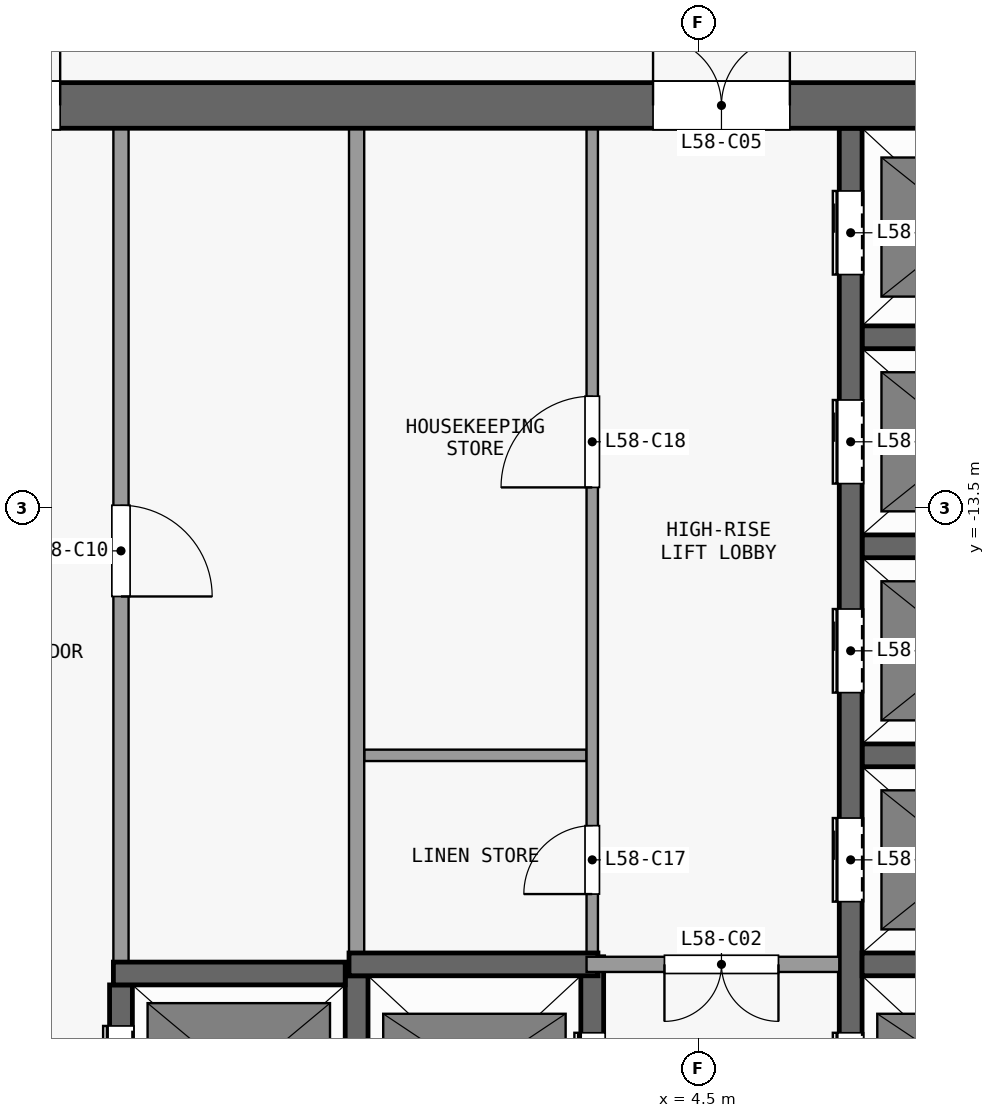
"""IFC4 building model, lengths in metres.
Left out: names, types, materials, properties, quantities, classifications, styles, units other than length and angle.
Written with IfcOpenShell. Run it as: python <this file> out.ifc"""

import sys

from ifc_helpers import new_model, si_unit, direction, frame, frame_2d, origin, place, context, subcontext, project, spatial, rectangle, extrude, element, fill, save


model = new_model("IFC4")
c1 = context("Model", 3, precision=1e-05, world=origin(), true_north=direction((0.0, 1.0)))
c2 = subcontext(c1, "Body", "Model", "MODEL_VIEW")
j1 = project(units=[si_unit("LENGTHUNIT", "METRE"), si_unit("PLANEANGLEUNIT", "RADIAN")], contexts=[c1])
p1 = place(None, origin())
s1 = spatial("IfcSite", under=j1, at=p1, CompositionType="ELEMENT")
p2 = place(p1, origin())
s2 = spatial("IfcBuilding", under=s1, at=p2, CompositionType="ELEMENT")
p3 = place(p2, frame((0.0, 0.0, 230.3)))
s3 = spatial("IfcBuildingStorey", under=s2, at=p3, CompositionType="ELEMENT", Elevation=230.3)
p4 = place(p3, frame((-13.2, -8.2, 0.0), z_axis=(0.0, 0.0, 1.0), x_axis=(1.0, 0.0, 0.0)))
e1 = element("IfcWall", 1, at=p4, inside=s3, PredefinedType="SHEAR", context=c2, shape_type="SweptSolid", body=[
    extrude(rectangle(XDim=26.4, YDim=0.6, at=frame_2d((13.2, 0.0))), origin(), (0.0, 0.0, 1.0), 3.3),
])
p5 = place(p4, frame((7.5, 0.0, 0.0)))
e2 = element("IfcOpeningElement", 2, at=p5, cuts=e1, PredefinedType="OPENING", context=c2, shape_type="SweptSolid", body=[
    extrude(rectangle(XDim=1.8, YDim=2.1, at=frame_2d((0.9, 1.05))), frame((0.0, 0.31, 0.0), z_axis=(0.0, -1.0, 0.0), x_axis=(1.0, 0.0, 0.0)), (0.0, 0.0, 1.0), 0.62),
])
p6 = place(p4, frame((17.1, 0.0, 0.0)))
e3 = element("IfcOpeningElement", 3, at=p6, cuts=e1, PredefinedType="OPENING", context=c2, shape_type="SweptSolid", body=[
    extrude(rectangle(XDim=1.8, YDim=2.1, at=frame_2d((0.9, 1.05))), frame((0.0, 0.31, 0.0), z_axis=(0.0, -1.0, 0.0), x_axis=(1.0, 0.0, 0.0)), (0.0, 0.0, 1.0), 0.62),
])
p7 = place(p4, frame((2.425, 0.0, 0.0)))
e4 = element("IfcOpeningElement", 4, at=p7, cuts=e1, PredefinedType="OPENING", context=c2, shape_type="SweptSolid", body=[
    extrude(rectangle(XDim=0.9, YDim=2.1, at=frame_2d((0.45, 1.05))), frame((0.0, 0.31, 0.0), z_axis=(0.0, -1.0, 0.0), x_axis=(1.0, 0.0, 0.0)), (0.0, 0.0, 1.0), 0.62),
])
p8 = place(p4, frame((23.075, 0.0, 0.0)))
e5 = element("IfcOpeningElement", 5, at=p8, cuts=e1, PredefinedType="OPENING", context=c2, shape_type="SweptSolid", body=[
    extrude(rectangle(XDim=0.9, YDim=2.1, at=frame_2d((0.45, 1.05))), frame((0.0, 0.31, 0.0), z_axis=(0.0, -1.0, 0.0), x_axis=(1.0, 0.0, 0.0)), (0.0, 0.0, 1.0), 0.62),
])
p9 = place(p3, frame((-3.2, -19.62, 0.0), z_axis=(0.0, 0.0, 1.0), x_axis=(1.0, 0.0, 0.0)))
e6 = element("IfcWall", 6, at=p9, inside=s3, PredefinedType="SHEAR", context=c2, shape_type="SweptSolid", body=[
    extrude(rectangle(XDim=3.05, YDim=0.3, at=frame_2d((1.525, 0.0))), origin(), (0.0, 0.0, 1.0), 3.3),
])
p10 = place(p3, frame((-0.1, -19.5, 0.0), z_axis=(0.0, 0.0, 1.0), x_axis=(1.0, 0.0, 0.0)))
e7 = element("IfcWall", 7, at=p10, inside=s3, PredefinedType="SHEAR", context=c2, shape_type="SweptSolid", body=[
    extrude(rectangle(XDim=3.275, YDim=0.3, at=frame_2d((1.638, 0.0))), origin(), (0.0, 0.0, 1.0), 3.3),
])
p11 = place(p3, frame((6.35, -19.5, 0.0), z_axis=(0.0, 0.0, 1.0), x_axis=(-1.0, 0.0, 0.0)))
e8 = element("IfcWall", 8, at=p11, inside=s3, PredefinedType="PARTITIONING", context=c2, shape_type="SweptSolid", body=[
    extrude(rectangle(XDim=3.325, YDim=0.2, at=frame_2d((1.663, 0.0))), origin(), (0.0, 0.0, 1.0), 3.3),
])
p12 = place(p11, frame((0.8, 0.0, 0.0)))
e9 = element("IfcOpeningElement", 9, at=p12, cuts=e8, PredefinedType="OPENING", context=c2, shape_type="SweptSolid", body=[
    extrude(rectangle(XDim=1.5, YDim=2.1, at=frame_2d((0.75, 1.05))), frame((0.0, 0.11, 0.0), z_axis=(0.0, -1.0, 0.0), x_axis=(1.0, 0.0, 0.0)), (0.0, 0.0, 1.0), 0.22),
])
p13 = place(p3, frame((6.65, -19.5, 0.0), z_axis=(0.0, 0.0, 1.0), x_axis=(1.0, 0.0, 0.0)))
e10 = element("IfcWall", 10, at=p13, inside=s3, PredefinedType="SHEAR", context=c2, shape_type="SweptSolid", body=[
    extrude(rectangle(XDim=2.8, YDim=0.3, at=frame_2d((1.4, 0.0))), origin(), (0.0, 0.0, 1.0), 3.3),
])
p14 = place(p3, frame((0.1, -16.75, 0.0), z_axis=(0.0, 0.0, 1.0), x_axis=(1.0, 0.0, 0.0)))
e11 = element("IfcWall", 11, at=p14, inside=s3, PredefinedType="PARTITIONING", context=c2, shape_type="SweptSolid", body=[
    extrude(rectangle(XDim=2.925, YDim=0.15, at=frame_2d((1.462, 0.0))), origin(), (0.0, 0.0, 1.0), 3.3),
])
for number, where, z_axis, x_axis in (
    (12, (6.65, -16.75, 0.0), (0.0, 0.0, 1.0), (1.0, 0.0, 0.0)),
    (13, (6.65, -14.0, 0.0), (0.0, 0.0, 1.0), (1.0, 0.0, 0.0)),
    (14, (6.65, -11.25, 0.0), (0.0, 0.0, 1.0), (1.0, 0.0, 0.0)),
):
    element("IfcWall", number, at=place(p3, frame(where, z_axis=z_axis, x_axis=x_axis)), inside=s3, PredefinedType="SHEAR", context=c2, shape_type="SweptSolid", body=[
        extrude(rectangle(XDim=2.8, YDim=0.3, at=frame_2d((1.4, 0.0))), origin(), (0.0, 0.0, 1.0), 3.3),
    ])
p15 = place(p3, frame((-3.1, -22.25, 0.0), z_axis=(0.0, 0.0, 1.0), x_axis=(0.0, 1.0, 0.0)))
e15 = element("IfcWall", 15, at=p15, inside=s3, PredefinedType="SHEAR", context=c2, shape_type="SweptSolid", body=[
    extrude(rectangle(XDim=2.48, YDim=0.3, at=frame_2d((1.24, 0.0))), origin(), (0.0, 0.0, 1.0), 3.3),
])
p16 = place(p15, frame((0.54, 0.0, 0.0)))
e16 = element("IfcOpeningElement", 16, at=p16, cuts=e15, PredefinedType="OPENING", context=c2, shape_type="SweptSolid", body=[
    extrude(rectangle(XDim=1.4, YDim=2.1, at=frame_2d((0.7, 1.05))), frame((0.0, 0.16, 0.0), z_axis=(0.0, -1.0, 0.0), x_axis=(1.0, 0.0, 0.0)), (0.0, 0.0, 1.0), 0.32),
])
p17 = place(p3, frame((-3.1, -8.5, 0.0), z_axis=(0.0, 0.0, 1.0), x_axis=(0.0, -1.0, 0.0)))
e17 = element("IfcWall", 17, at=p17, inside=s3, PredefinedType="PARTITIONING", context=c2, shape_type="SweptSolid", body=[
    extrude(rectangle(XDim=10.97, YDim=0.2, at=frame_2d((5.485, 0.0))), origin(), (0.0, 0.0, 1.0), 3.3),
])
p18 = place(p17, frame((4.96, 0.0, 0.0)))
e18 = element("IfcOpeningElement", 18, at=p18, cuts=e17, PredefinedType="OPENING", context=c2, shape_type="SweptSolid", body=[
    extrude(rectangle(XDim=1.2, YDim=2.1, at=frame_2d((0.6, 1.05))), frame((0.0, 0.11, 0.0), z_axis=(0.0, -1.0, 0.0), x_axis=(1.0, 0.0, 0.0)), (0.0, 0.0, 1.0), 0.22),
])
p19 = place(p3, frame((0.0, -22.25, 0.0), z_axis=(0.0, 0.0, 1.0), x_axis=(0.0, 1.0, 0.0)))
e19 = element("IfcWall", 19, at=p19, inside=s3, PredefinedType="SHEAR", context=c2, shape_type="SweptSolid", body=[
    extrude(rectangle(XDim=2.6, YDim=0.3, at=frame_2d((1.3, 0.0))), origin(), (0.0, 0.0, 1.0), 3.3),
])
p20 = place(p3, frame((0.0, -19.35, 0.0), z_axis=(0.0, 0.0, 1.0), x_axis=(0.0, 1.0, 0.0)))
e20 = element("IfcWall", 20, at=p20, inside=s3, PredefinedType="PARTITIONING", context=c2, shape_type="SweptSolid", body=[
    extrude(rectangle(XDim=10.85, YDim=0.2, at=frame_2d((5.425, 0.0))), origin(), (0.0, 0.0, 1.0), 3.3),
])
p21 = place(p3, frame((3.1, -22.25, 0.0), z_axis=(0.0, 0.0, 1.0), x_axis=(0.0, 1.0, 0.0)))
e21 = element("IfcWall", 21, at=p21, inside=s3, PredefinedType="SHEAR", context=c2, shape_type="SweptSolid", body=[
    extrude(rectangle(XDim=2.85, YDim=0.3, at=frame_2d((1.425, 0.0))), origin(), (0.0, 0.0, 1.0), 3.3),
])
p22 = place(p21, frame((0.75, 0.0, 0.0)))
e22 = element("IfcOpeningElement", 22, at=p22, cuts=e21, PredefinedType="OPENING", context=c2, shape_type="SweptSolid", body=[
    extrude(rectangle(XDim=1.1, YDim=2.1, at=frame_2d((0.55, 1.05))), frame((0.0, 0.16, 0.0), z_axis=(0.0, -1.0, 0.0), x_axis=(1.0, 0.0, 0.0)), (0.0, 0.0, 1.0), 0.32),
])
p23 = place(p3, frame((3.1, -19.4, 0.0), z_axis=(0.0, 0.0, 1.0), x_axis=(0.0, 1.0, 0.0)))
e23 = element("IfcWall", 23, at=p23, inside=s3, PredefinedType="PARTITIONING", context=c2, shape_type="SweptSolid", body=[
    extrude(rectangle(XDim=10.9, YDim=0.15, at=frame_2d((5.45, 0.0))), origin(), (0.0, 0.0, 1.0), 3.3),
])
p24 = place(p23, frame((0.825, 0.0, 0.0)))
e24 = element("IfcOpeningElement", 24, at=p24, cuts=e23, PredefinedType="OPENING", context=c2, shape_type="SweptSolid", body=[
    extrude(rectangle(XDim=0.9, YDim=2.1, at=frame_2d((0.45, 1.05))), frame((0.0, 0.085, 0.0), z_axis=(0.0, -1.0, 0.0), x_axis=(1.0, 0.0, 0.0)), (0.0, 0.0, 1.0), 0.17),
])
p25 = place(p23, frame((6.175, 0.0, 0.0)))
e25 = element("IfcOpeningElement", 25, at=p25, cuts=e23, PredefinedType="OPENING", context=c2, shape_type="SweptSolid", body=[
    extrude(rectangle(XDim=1.2, YDim=2.1, at=frame_2d((0.6, 1.05))), frame((0.0, 0.085, 0.0), z_axis=(0.0, -1.0, 0.0), x_axis=(1.0, 0.0, 0.0)), (0.0, 0.0, 1.0), 0.17),
])
p26 = place(p3, frame((6.5, -22.55, 0.0), z_axis=(0.0, 0.0, 1.0), x_axis=(0.0, 1.0, 0.0)))
e26 = element("IfcWall", 26, at=p26, inside=s3, PredefinedType="SHEAR", context=c2, shape_type="SweptSolid", body=[
    extrude(rectangle(XDim=14.05, YDim=0.3, at=frame_2d((7.025, 0.0))), origin(), (0.0, 0.0, 1.0), 3.3),
])
p27 = place(p26, frame((1.05, 0.0, 0.0)))
e27 = element("IfcOpeningElement", 27, at=p27, cuts=e26, PredefinedType="OPENING", context=c2, shape_type="SweptSolid", body=[
    extrude(rectangle(XDim=1.1, YDim=2.1, at=frame_2d((0.55, 1.05))), frame((0.0, 0.16, 0.0), z_axis=(0.0, -1.0, 0.0), x_axis=(1.0, 0.0, 0.0)), (0.0, 0.0, 1.0), 0.32),
])
p28 = place(p26, frame((3.875, 0.0, 0.0)))
e28 = element("IfcOpeningElement", 28, at=p28, cuts=e26, PredefinedType="OPENING", context=c2, shape_type="SweptSolid", body=[
    extrude(rectangle(XDim=1.1, YDim=2.1, at=frame_2d((0.55, 1.05))), frame((0.0, 0.16, 0.0), z_axis=(0.0, -1.0, 0.0), x_axis=(1.0, 0.0, 0.0)), (0.0, 0.0, 1.0), 0.32),
])
p29 = place(p26, frame((6.625, 0.0, 0.0)))
e29 = element("IfcOpeningElement", 29, at=p29, cuts=e26, PredefinedType="OPENING", context=c2, shape_type="SweptSolid", body=[
    extrude(rectangle(XDim=1.1, YDim=2.1, at=frame_2d((0.55, 1.05))), frame((0.0, 0.16, 0.0), z_axis=(0.0, -1.0, 0.0), x_axis=(1.0, 0.0, 0.0)), (0.0, 0.0, 1.0), 0.32),
])
p30 = place(p26, frame((9.375, 0.0, 0.0)))
e30 = element("IfcOpeningElement", 30, at=p30, cuts=e26, PredefinedType="OPENING", context=c2, shape_type="SweptSolid", body=[
    extrude(rectangle(XDim=1.1, YDim=2.1, at=frame_2d((0.55, 1.05))), frame((0.0, 0.16, 0.0), z_axis=(0.0, -1.0, 0.0), x_axis=(1.0, 0.0, 0.0)), (0.0, 0.0, 1.0), 0.32),
])
p31 = place(p26, frame((12.125, 0.0, 0.0)))
e31 = element("IfcOpeningElement", 31, at=p31, cuts=e26, PredefinedType="OPENING", context=c2, shape_type="SweptSolid", body=[
    extrude(rectangle(XDim=1.1, YDim=2.1, at=frame_2d((0.55, 1.05))), frame((0.0, 0.16, 0.0), z_axis=(0.0, -1.0, 0.0), x_axis=(1.0, 0.0, 0.0)), (0.0, 0.0, 1.0), 0.32),
])
p32 = place(p22, origin())
e32 = element("IfcDoor", 32, at=p32, inside=s3, OperationType="DOUBLE_DOOR_SLIDING", PredefinedType="DOOR", context=c2, shape_type="SweptSolid", body=[
    extrude(rectangle(XDim=1.1, YDim=2.1, at=frame_2d((0.55, 1.05))), frame((0.0, 0.025, 0.0), z_axis=(0.0, -1.0, 0.0), x_axis=(1.0, 0.0, 0.0)), (0.0, 0.0, 1.0), 0.05),
])
fill(e22, e32)
p33 = place(p27, origin())
e33 = element("IfcDoor", 33, at=p33, inside=s3, OperationType="DOUBLE_DOOR_SLIDING", PredefinedType="DOOR", context=c2, shape_type="SweptSolid", body=[
    extrude(rectangle(XDim=1.1, YDim=2.1, at=frame_2d((0.55, 1.05))), frame((0.0, 0.025, 0.0), z_axis=(0.0, -1.0, 0.0), x_axis=(1.0, 0.0, 0.0)), (0.0, 0.0, 1.0), 0.05),
])
fill(e27, e33)
p34 = place(p28, origin())
e34 = element("IfcDoor", 34, at=p34, inside=s3, OperationType="DOUBLE_DOOR_SLIDING", PredefinedType="DOOR", context=c2, shape_type="SweptSolid", body=[
    extrude(rectangle(XDim=1.1, YDim=2.1, at=frame_2d((0.55, 1.05))), frame((0.0, 0.025, 0.0), z_axis=(0.0, -1.0, 0.0), x_axis=(1.0, 0.0, 0.0)), (0.0, 0.0, 1.0), 0.05),
])
fill(e28, e34)
p35 = place(p29, origin())
e35 = element("IfcDoor", 35, at=p35, inside=s3, OperationType="DOUBLE_DOOR_SLIDING", PredefinedType="DOOR", context=c2, shape_type="SweptSolid", body=[
    extrude(rectangle(XDim=1.1, YDim=2.1, at=frame_2d((0.55, 1.05))), frame((0.0, 0.025, 0.0), z_axis=(0.0, -1.0, 0.0), x_axis=(1.0, 0.0, 0.0)), (0.0, 0.0, 1.0), 0.05),
])
fill(e29, e35)
p36 = place(p30, origin())
e36 = element("IfcDoor", 36, at=p36, inside=s3, OperationType="DOUBLE_DOOR_SLIDING", PredefinedType="DOOR", context=c2, shape_type="SweptSolid", body=[
    extrude(rectangle(XDim=1.1, YDim=2.1, at=frame_2d((0.55, 1.05))), frame((0.0, 0.025, 0.0), z_axis=(0.0, -1.0, 0.0), x_axis=(1.0, 0.0, 0.0)), (0.0, 0.0, 1.0), 0.05),
])
fill(e30, e36)
p37 = place(p31, origin())
e37 = element("IfcDoor", 37, at=p37, inside=s3, OperationType="DOUBLE_DOOR_SLIDING", PredefinedType="DOOR", context=c2, shape_type="SweptSolid", body=[
    extrude(rectangle(XDim=1.1, YDim=2.1, at=frame_2d((0.55, 1.05))), frame((0.0, 0.025, 0.0), z_axis=(0.0, -1.0, 0.0), x_axis=(1.0, 0.0, 0.0)), (0.0, 0.0, 1.0), 0.05),
])
fill(e31, e37)
p38 = place(p16, origin())
e38 = element("IfcDoor", 38, at=p38, inside=s3, OperationType="DOUBLE_DOOR_SLIDING", PredefinedType="DOOR", context=c2, shape_type="SweptSolid", body=[
    extrude(rectangle(XDim=1.4, YDim=2.1, at=frame_2d((0.7, 1.05))), frame((0.0, 0.025, 0.0), z_axis=(0.0, -1.0, 0.0), x_axis=(1.0, 0.0, 0.0)), (0.0, 0.0, 1.0), 0.05),
])
fill(e16, e38)
p39 = place(p12, origin())
e39 = element("IfcDoor", 39, at=p39, inside=s3, OperationType="DOUBLE_DOOR_SINGLE_SWING", PredefinedType="DOOR", context=c2, shape_type="SweptSolid", body=[
    extrude(rectangle(XDim=1.5, YDim=2.1, at=frame_2d((0.75, 1.05))), frame((0.0, 0.025, 0.0), z_axis=(0.0, -1.0, 0.0), x_axis=(1.0, 0.0, 0.0)), (0.0, 0.0, 1.0), 0.05),
])
fill(e9, e39)
p40 = place(p5, origin())
e40 = element("IfcDoor", 40, at=p40, inside=s3, OperationType="DOUBLE_DOOR_SINGLE_SWING", PredefinedType="DOOR", context=c2, shape_type="SweptSolid", body=[
    extrude(rectangle(XDim=1.8, YDim=2.1, at=frame_2d((0.9, 1.05))), frame((0.0, 0.025, 0.0), z_axis=(0.0, -1.0, 0.0), x_axis=(1.0, 0.0, 0.0)), (0.0, 0.0, 1.0), 0.05),
])
fill(e2, e40)
p41 = place(p6, origin())
e41 = element("IfcDoor", 41, at=p41, inside=s3, OperationType="DOUBLE_DOOR_SINGLE_SWING", PredefinedType="DOOR", context=c2, shape_type="SweptSolid", body=[
    extrude(rectangle(XDim=1.8, YDim=2.1, at=frame_2d((0.9, 1.05))), frame((0.0, 0.025, 0.0), z_axis=(0.0, -1.0, 0.0), x_axis=(1.0, 0.0, 0.0)), (0.0, 0.0, 1.0), 0.05),
])
fill(e3, e41)
p42 = place(p18, origin())
e42 = element("IfcDoor", 42, at=p42, inside=s3, OperationType="SINGLE_SWING_RIGHT", PredefinedType="DOOR", context=c2, shape_type="SweptSolid", body=[
    extrude(rectangle(XDim=1.2, YDim=2.1, at=frame_2d((0.6, 1.05))), frame((0.0, 0.025, 0.0), z_axis=(0.0, -1.0, 0.0), x_axis=(1.0, 0.0, 0.0)), (0.0, 0.0, 1.0), 0.05),
])
fill(e18, e42)
p43 = place(p24, origin())
e43 = element("IfcDoor", 43, at=p43, inside=s3, OperationType="SINGLE_SWING_LEFT", PredefinedType="DOOR", context=c2, shape_type="SweptSolid", body=[
    extrude(rectangle(XDim=0.9, YDim=2.1, at=frame_2d((0.45, 1.05))), frame((0.0, 0.025, 0.0), z_axis=(0.0, -1.0, 0.0), x_axis=(1.0, 0.0, 0.0)), (0.0, 0.0, 1.0), 0.05),
])
fill(e24, e43)
p44 = place(p25, origin())
e44 = element("IfcDoor", 44, at=p44, inside=s3, OperationType="SINGLE_SWING_LEFT", PredefinedType="DOOR", context=c2, shape_type="SweptSolid", body=[
    extrude(rectangle(XDim=1.2, YDim=2.1, at=frame_2d((0.6, 1.05))), frame((0.0, 0.025, 0.0), z_axis=(0.0, -1.0, 0.0), x_axis=(1.0, 0.0, 0.0)), (0.0, 0.0, 1.0), 0.05),
])
fill(e25, e44)
save(model, sys.argv[1])
